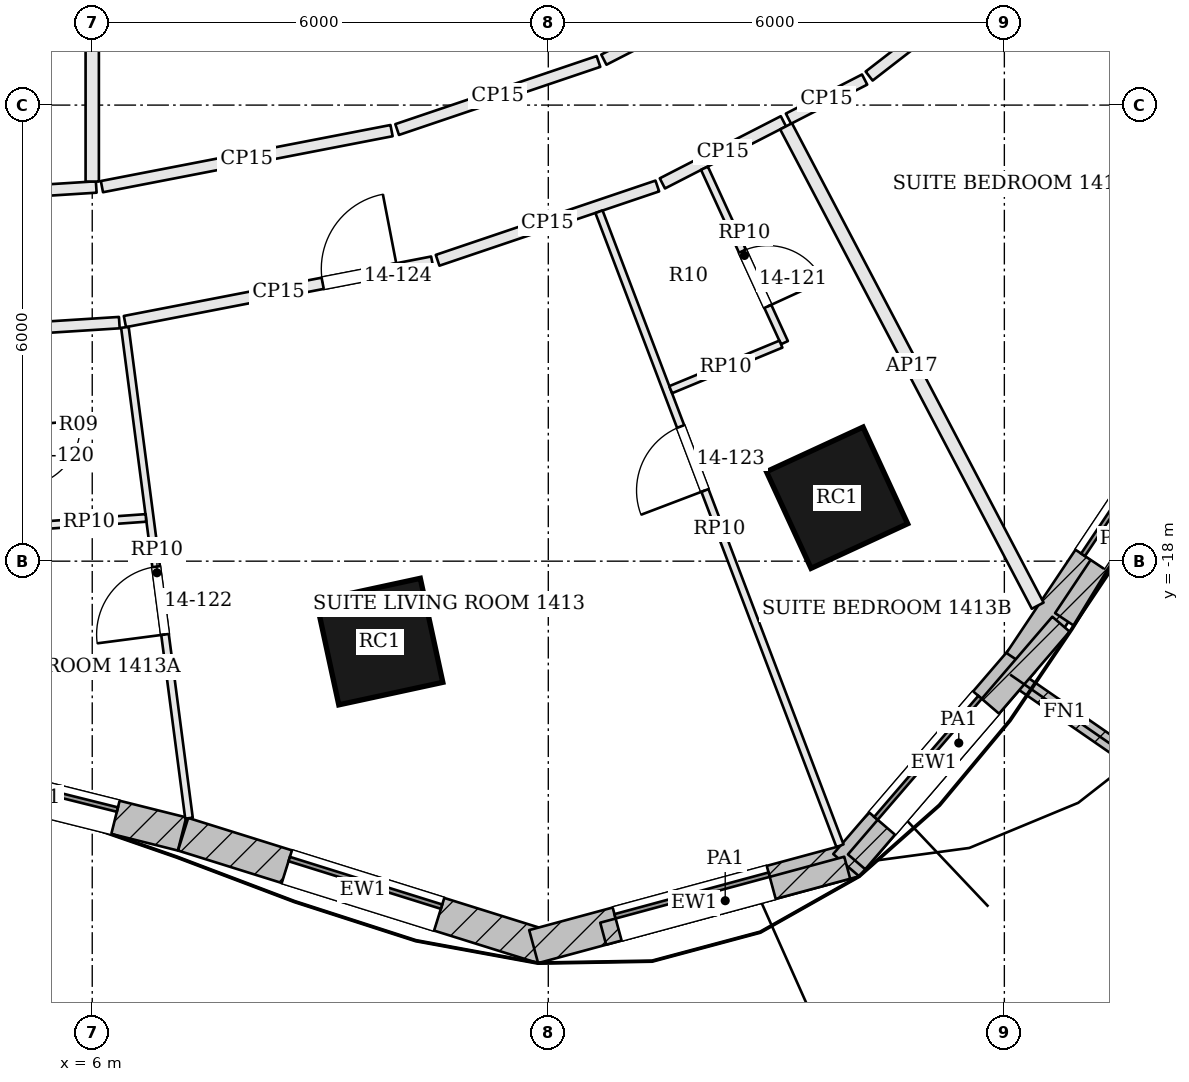
"""IFC4 building model, lengths in metres.
Left out: names, types, materials, properties, quantities, classifications, styles, units other than length and angle.
Written with IfcOpenShell. Run it as: python <this file> out.ifc"""

import sys

from ifc_helpers import new_model, si_unit, direction, frame, frame_2d, origin, origin_2d, place, context, subcontext, project, spatial, rectangle, extrude, element, fill, save


model = new_model("IFC4")
c1 = context("Model", 3, precision=1e-05, world=origin(), true_north=direction((0.0, 1.0)))
c2 = subcontext(c1, "Body", "Model", "MODEL_VIEW")
j1 = project(units=[si_unit("LENGTHUNIT", "METRE"), si_unit("PLANEANGLEUNIT", "RADIAN")], contexts=[c1])
p1 = place(None, origin())
s1 = spatial("IfcSite", under=j1, at=p1, CompositionType="ELEMENT")
p2 = place(p1, origin())
s2 = spatial("IfcBuilding", under=s1, at=p2, CompositionType="ELEMENT")
p3 = place(p2, frame((0.0, 0.0, 66.3)))
s3 = spatial("IfcBuildingStorey", under=s2, at=p3, CompositionType="ELEMENT", Elevation=66.3)
for number, where, z_axis, x_axis in (
    (1, (9.78, -19.058, 0.0), (0.0, 0.0, 1.0), (0.977, 0.211, 0.0)),
    (2, (15.799, -17.165, 0.0), (0.0, 0.0, 1.0), (0.908, 0.419, 0.0)),
):
    element("IfcColumn", number, at=place(p3, frame(where, z_axis=z_axis, x_axis=x_axis)), inside=s3, PredefinedType="COLUMN", context=c2, shape_type="SweptSolid", body=[
        extrude(rectangle(XDim=1.4, YDim=1.4, at=origin_2d()), origin(), (0.0, 0.0, 1.0), 3.6),
    ])
p4 = place(p3, frame((3.392, -20.642, 0.0), z_axis=(0.0, 0.0, 1.0), x_axis=(0.970168229467, -0.242432684539, 0.0)))
e3 = element("IfcWall", 3, at=p4, inside=s3, PredefinedType="SOLIDWALL", context=c2, shape_type="SweptSolid", body=[
    extrude(rectangle(XDim=3.906, YDim=0.45, at=frame_2d((1.953, 0.0))), origin(), (0.0, 0.0, 1.0), 3.4),
])
p5 = place(p4, frame((0.903, 0.0, 0.9)))
e4 = element("IfcOpeningElement", 4, at=p5, cuts=e3, PredefinedType="OPENING", context=c2, shape_type="SweptSolid", body=[
    extrude(rectangle(XDim=2.1, YDim=2.0, at=frame_2d((1.05, 1.0))), frame((0.0, 0.235, 0.0), z_axis=(0.0, -1.0, 0.0), x_axis=(1.0, 0.0, 0.0)), (0.0, 0.0, 1.0), 0.47),
])
p6 = place(p3, frame((7.196, -21.593, 0.0), z_axis=(0.0, 0.0, 1.0), x_axis=(0.954471218741, -0.298303021432, 0.0)))
e5 = element("IfcWall", 5, at=p6, inside=s3, PredefinedType="SOLIDWALL", context=c2, shape_type="SweptSolid", body=[
    extrude(rectangle(XDim=4.96, YDim=0.45, at=frame_2d((2.48, 0.0))), origin(), (0.0, 0.0, 1.0), 3.4),
])
p7 = place(p6, frame((1.43, 0.0, 0.9)))
e6 = element("IfcOpeningElement", 6, at=p7, cuts=e5, PredefinedType="OPENING", context=c2, shape_type="SweptSolid", body=[
    extrude(rectangle(XDim=2.1, YDim=2.0, at=frame_2d((1.05, 1.0))), frame((0.0, 0.235, 0.0), z_axis=(0.0, -1.0, 0.0), x_axis=(1.0, 0.0, 0.0)), (0.0, 0.0, 1.0), 0.47),
])
p8 = place(p3, frame((11.807, -23.071, 0.0), z_axis=(0.0, 0.0, 1.0), x_axis=(0.965334520334, 0.261015830653, 0.0)))
e7 = element("IfcWall", 7, at=p8, inside=s3, PredefinedType="SOLIDWALL", context=c2, shape_type="SweptSolid", body=[
    extrude(rectangle(XDim=4.375, YDim=0.45, at=frame_2d((2.188, 0.0))), origin(), (0.0, 0.0, 1.0), 3.4),
])
p9 = place(p8, frame((1.138, 0.0, 0.9)))
e8 = element("IfcOpeningElement", 8, at=p9, cuts=e7, PredefinedType="OPENING", context=c2, shape_type="SweptSolid", body=[
    extrude(rectangle(XDim=2.1, YDim=2.0, at=frame_2d((1.05, 1.0))), frame((0.0, 0.235, 0.0), z_axis=(0.0, -1.0, 0.0), x_axis=(1.0, 0.0, 0.0)), (0.0, 0.0, 1.0), 0.47),
])
p10 = place(p3, frame((15.919, -21.999, 0.0), z_axis=(0.0, 0.0, 1.0), x_axis=(0.652009971272, 0.758210391225, 0.0)))
e9 = element("IfcWall", 9, at=p10, inside=s3, PredefinedType="SOLIDWALL", context=c2, shape_type="SweptSolid", body=[
    extrude(rectangle(XDim=3.545, YDim=0.45, at=frame_2d((1.772, 0.0))), origin(), (0.0, 0.0, 1.0), 3.4),
])
p11 = place(p10, frame((0.722, 0.0, 0.9)))
e10 = element("IfcOpeningElement", 10, at=p11, cuts=e9, PredefinedType="OPENING", context=c2, shape_type="SweptSolid", body=[
    extrude(rectangle(XDim=2.1, YDim=2.0, at=frame_2d((1.05, 1.0))), frame((0.0, 0.235, 0.0), z_axis=(0.0, -1.0, 0.0), x_axis=(1.0, 0.0, 0.0)), (0.0, 0.0, 1.0), 0.47),
])
p12 = place(p3, frame((18.214, -19.333, 0.0), z_axis=(0.0, 0.0, 1.0), x_axis=(0.555833135316, 0.831293886471, 0.0)))
e11 = element("IfcWall", 11, at=p12, inside=s3, PredefinedType="SOLIDWALL", context=c2, shape_type="SweptSolid", body=[
    extrude(rectangle(XDim=5.368, YDim=0.45, at=frame_2d((2.684, 0.0))), origin(), (0.0, 0.0, 1.0), 3.4),
])
p13 = place(p12, frame((1.634, 0.0, 0.9)))
e12 = element("IfcOpeningElement", 12, at=p13, cuts=e11, PredefinedType="OPENING", context=c2, shape_type="SweptSolid", body=[
    extrude(rectangle(XDim=2.1, YDim=2.0, at=frame_2d((1.05, 1.0))), frame((0.0, 0.235, 0.0), z_axis=(0.0, -1.0, 0.0), x_axis=(1.0, 0.0, 0.0)), (0.0, 0.0, 1.0), 0.47),
])
p14 = place(p3, frame((18.076, -19.492, 0.0), z_axis=(0.0, 0.0, 1.0), x_axis=(0.822618823872, -0.568593238274, 0.0)))
e13 = element("IfcWall", 13, at=p14, inside=s3, PredefinedType="SOLIDWALL", context=c2, shape_type="SweptSolid", body=[
    extrude(rectangle(XDim=1.75, YDim=0.2, at=frame_2d((0.875, 0.0))), origin(), (0.0, 0.0, 1.0), 3.4),
])
p15 = place(p3, frame((12.722, -22.901, 3.6), z_axis=(0.0, 0.0, 1.0), x_axis=(0.96534590031, 0.260973739589, 0.0)))
e14 = element("IfcWall", 14, at=p15, inside=s3, PredefinedType="PARAPET", context=c2, shape_type="SweptSolid", body=[
    extrude(rectangle(XDim=3.326, YDim=0.3, at=frame_2d((1.663, 0.0))), origin(), (0.0, 0.0, 1.0), 1.1),
])
p16 = place(p3, frame((16.056, -21.956, 3.6), z_axis=(0.0, 0.0, 1.0), x_axis=(0.652038588201, 0.75818578165, 0.0)))
e15 = element("IfcWall", 15, at=p16, inside=s3, PredefinedType="PARAPET", context=c2, shape_type="SweptSolid", body=[
    extrude(rectangle(XDim=4.124, YDim=0.3, at=frame_2d((2.062, 0.0))), origin(), (0.0, 0.0, 1.0), 1.1),
])
p17 = place(p3, frame((18.792, -18.767, 3.6), z_axis=(0.0, 0.0, 1.0), x_axis=(0.555843382853, 0.831287034507, 0.0)))
e16 = element("IfcWall", 16, at=p17, inside=s3, PredefinedType="PARAPET", context=c2, shape_type="SweptSolid", body=[
    extrude(rectangle(XDim=2.562, YDim=0.3, at=frame_2d((1.281, 0.0))), origin(), (0.0, 0.0, 1.0), 1.1),
])
p18 = place(p3, frame((3.028, -15.073, 0.0), z_axis=(0.0, 0.0, 1.0), x_axis=(0.997992583289, 0.063330906356, 0.0)))
e17 = element("IfcWall", 17, at=p18, inside=s3, PredefinedType="PARTITIONING", context=c2, shape_type="SweptSolid", body=[
    extrude(rectangle(XDim=3.334, YDim=0.15, at=frame_2d((1.667, 0.0))), origin(), (0.0, 0.0, 1.0), 2.68),
])
p19 = place(p3, frame((6.43, -14.848, 0.0), z_axis=(0.0, 0.0, 1.0), x_axis=(0.981801609996, 0.189909448446, 0.0)))
e18 = element("IfcWall", 18, at=p19, inside=s3, PredefinedType="PARTITIONING", context=c2, shape_type="SweptSolid", body=[
    extrude(rectangle(XDim=4.118, YDim=0.15, at=frame_2d((2.059, 0.0))), origin(), (0.0, 0.0, 1.0), 2.68),
])
p20 = place(p19, frame((2.65, 0.0, 0.0)))
e19 = element("IfcOpeningElement", 19, at=p20, cuts=e18, PredefinedType="OPENING", context=c2, shape_type="SweptSolid", body=[
    extrude(rectangle(XDim=1.0, YDim=2.1, at=frame_2d((0.5, 1.05))), frame((0.0, 0.085, 0.0), z_axis=(0.0, -1.0, 0.0), x_axis=(1.0, 0.0, 0.0)), (0.0, 0.0, 1.0), 0.17),
])
p21 = place(p3, frame((10.544, -14.042, 0.0), z_axis=(0.0, 0.0, 1.0), x_axis=(0.947314242069, 0.320305677085, 0.0)))
e20 = element("IfcWall", 20, at=p21, inside=s3, PredefinedType="PARTITIONING", context=c2, shape_type="SweptSolid", body=[
    extrude(rectangle(XDim=3.051, YDim=0.15, at=frame_2d((1.525, 0.0))), origin(), (0.0, 0.0, 1.0), 2.68),
])
p22 = place(p3, frame((13.501, -13.03, 0.0), z_axis=(0.0, 0.0, 1.0), x_axis=(0.88960147572, 0.456737577168, 0.0)))
e21 = element("IfcWall", 21, at=p22, inside=s3, PredefinedType="PARTITIONING", context=c2, shape_type="SweptSolid", body=[
    extrude(rectangle(XDim=1.79, YDim=0.15, at=frame_2d((0.895, 0.0))), origin(), (0.0, 0.0, 1.0), 2.68),
])
p23 = place(p3, frame((18.439, -18.586, 0.0), z_axis=(0.0, 0.0, 1.0), x_axis=(-0.464812403085, 0.885409187855, 0.0)))
e22 = element("IfcWall", 22, at=p23, inside=s3, PredefinedType="PARTITIONING", context=c2, shape_type="SweptSolid", body=[
    extrude(rectangle(XDim=7.123, YDim=0.175, at=frame_2d((3.562, 0.0))), origin(), (0.0, 0.0, 1.0), 2.68),
])
p24 = place(p3, frame((15.16, -12.178, 0.0), z_axis=(0.0, 0.0, 1.0), x_axis=(0.889562255844, 0.456813958826, 0.0)))
e23 = element("IfcWall", 23, at=p24, inside=s3, PredefinedType="PARTITIONING", context=c2, shape_type="SweptSolid", body=[
    extrude(rectangle(XDim=1.126, YDim=0.15, at=frame_2d((0.563, 0.0))), origin(), (0.0, 0.0, 1.0), 2.68),
])
p25 = place(p3, frame((16.221, -11.618, 0.0), z_axis=(0.0, 0.0, 1.0), x_axis=(0.79075977513, 0.612126602948, 0.0)))
e24 = element("IfcWall", 24, at=p25, inside=s3, PredefinedType="PARTITIONING", context=c2, shape_type="SweptSolid", body=[
    extrude(rectangle(XDim=2.854, YDim=0.15, at=frame_2d((1.427, 0.0))), origin(), (0.0, 0.0, 1.0), 2.68),
])
p26 = place(p3, frame((15.125, -10.173, 0.0), z_axis=(0.0, 0.0, 1.0), x_axis=(-0.889567018144, -0.456804684993, 0.0)))
e25 = element("IfcWall", 25, at=p26, inside=s3, PredefinedType="PARTITIONING", context=c2, shape_type="SweptSolid", body=[
    extrude(rectangle(XDim=2.691, YDim=0.15, at=frame_2d((1.345, 0.0))), origin(), (0.0, 0.0, 1.0), 2.68),
])
p27 = place(p3, frame((12.66, -11.426, 0.0), z_axis=(0.0, 0.0, 1.0), x_axis=(-0.94731220982, -0.320311687465, 0.0)))
e26 = element("IfcWall", 26, at=p27, inside=s3, PredefinedType="PARTITIONING", context=c2, shape_type="SweptSolid", body=[
    extrude(rectangle(XDim=2.796, YDim=0.15, at=frame_2d((1.398, 0.0))), origin(), (0.0, 0.0, 1.0), 2.68),
])
p28 = place(p3, frame((9.938, -12.336, 0.0), z_axis=(0.0, 0.0, 1.0), x_axis=(-0.981799909949, -0.18991823721, 0.0)))
e27 = element("IfcWall", 27, at=p28, inside=s3, PredefinedType="PARTITIONING", context=c2, shape_type="SweptSolid", body=[
    extrude(rectangle(XDim=3.881, YDim=0.15, at=frame_2d((1.94, 0.0))), origin(), (0.0, 0.0, 1.0), 2.68),
])
p29 = place(p3, frame((6.053, -13.077, 0.0), z_axis=(0.0, 0.0, 1.0), x_axis=(-0.997994823425, -0.06329559556, 0.0)))
e28 = element("IfcWall", 28, at=p29, inside=s3, PredefinedType="PARTITIONING", context=c2, shape_type="SweptSolid", body=[
    extrude(rectangle(XDim=4.987, YDim=0.15, at=frame_2d((2.494, 0.0))), origin(), (0.0, 0.0, 1.0), 2.68),
])
p30 = place(p3, frame((7.273, -21.381, 0.0), z_axis=(0.0, 0.0, 1.0), x_axis=(-0.129491443272, 0.991580539401, 0.0)))
e29 = element("IfcWall", 29, at=p30, inside=s3, PredefinedType="PARTITIONING", context=c2, shape_type="SweptSolid", body=[
    extrude(rectangle(XDim=6.512, YDim=0.1, at=frame_2d((3.256, 0.0))), origin(), (0.0, 0.0, 1.0), 2.68),
])
p31 = place(p30, frame((2.437, 0.0, 0.0)))
e30 = element("IfcOpeningElement", 30, at=p31, cuts=e29, PredefinedType="OPENING", context=c2, shape_type="SweptSolid", body=[
    extrude(rectangle(XDim=0.9, YDim=2.4, at=frame_2d((0.45, 1.2))), frame((0.0, 0.06, 0.0), z_axis=(0.0, -1.0, 0.0), x_axis=(1.0, 0.0, 0.0)), (0.0, 0.0, 1.0), 0.12),
])
p32 = place(p3, frame((15.837, -21.743, 0.0), z_axis=(0.0, 0.0, 1.0), x_axis=(-0.355314828952, 0.934746688856, 0.0)))
e31 = element("IfcWall", 31, at=p32, inside=s3, PredefinedType="PARTITIONING", context=c2, shape_type="SweptSolid", body=[
    extrude(rectangle(XDim=8.923, YDim=0.1, at=frame_2d((4.461, 0.0))), origin(), (0.0, 0.0, 1.0), 2.68),
])
p33 = place(p32, frame((5.0, 0.0, 0.0)))
e32 = element("IfcOpeningElement", 32, at=p33, cuts=e31, PredefinedType="OPENING", context=c2, shape_type="SweptSolid", body=[
    extrude(rectangle(XDim=0.9, YDim=2.4, at=frame_2d((0.45, 1.2))), frame((0.0, 0.06, 0.0), z_axis=(0.0, -1.0, 0.0), x_axis=(1.0, 0.0, 0.0)), (0.0, 0.0, 1.0), 0.12),
])
p34 = place(p3, frame((5.213, -17.538, 0.0), z_axis=(0.0, 0.0, 1.0), x_axis=(0.997447931568, 0.071397645698, 0.0)))
e33 = element("IfcWall", 33, at=p34, inside=s3, PredefinedType="PARTITIONING", context=c2, shape_type="SweptSolid", body=[
    extrude(rectangle(XDim=1.498, YDim=0.1, at=frame_2d((0.749, 0.0))), origin(), (0.0, 0.0, 1.0), 2.68),
])
p35 = place(p3, frame((14.054, -12.83, 0.0), z_axis=(0.0, 0.0, 1.0), x_axis=(0.416714635196, -0.909037355015, 0.0)))
e34 = element("IfcWall", 34, at=p35, inside=s3, PredefinedType="PARTITIONING", context=c2, shape_type="SweptSolid", body=[
    extrude(rectangle(XDim=2.525, YDim=0.1, at=frame_2d((1.263, 0.0))), origin(), (0.0, 0.0, 1.0), 2.68),
])
p36 = place(p35, frame((1.2, 0.0, 0.0)))
e35 = element("IfcOpeningElement", 35, at=p36, cuts=e34, PredefinedType="OPENING", context=c2, shape_type="SweptSolid", body=[
    extrude(rectangle(XDim=0.8, YDim=2.1, at=frame_2d((0.4, 1.05))), frame((0.0, 0.06, 0.0), z_axis=(0.0, -1.0, 0.0), x_axis=(1.0, 0.0, 0.0)), (0.0, 0.0, 1.0), 0.12),
])
p37 = place(p3, frame((15.061, -15.145, 0.0), z_axis=(0.0, 0.0, 1.0), x_axis=(-0.924177864306, -0.381962400147, 0.0)))
e36 = element("IfcWall", 36, at=p37, inside=s3, PredefinedType="PARTITIONING", context=c2, shape_type="SweptSolid", body=[
    extrude(rectangle(XDim=1.569, YDim=0.1, at=frame_2d((0.785, 0.0))), origin(), (0.0, 0.0, 1.0), 2.68),
])
p38 = place(p3, frame((18.759, -9.648, 0.0), z_axis=(0.0, 0.0, 1.0), x_axis=(0.731331715945, -0.682021936049, 0.0)))
e37 = element("IfcWall", 37, at=p38, inside=s3, PredefinedType="PARTITIONING", context=c2, shape_type="SweptSolid", body=[
    extrude(rectangle(XDim=2.525, YDim=0.1, at=frame_2d((1.263, 0.0))), origin(), (0.0, 0.0, 1.0), 2.68),
])
p39 = place(p38, frame((1.2, 0.0, 0.0)))
e38 = element("IfcOpeningElement", 38, at=p39, cuts=e37, PredefinedType="OPENING", context=c2, shape_type="SweptSolid", body=[
    extrude(rectangle(XDim=0.8, YDim=2.1, at=frame_2d((0.4, 1.05))), frame((0.0, 0.06, 0.0), z_axis=(0.0, -1.0, 0.0), x_axis=(1.0, 0.0, 0.0)), (0.0, 0.0, 1.0), 0.12),
])
p40 = place(p3, frame((6.0, -13.006, 0.0), z_axis=(0.0, 0.0, 1.0), x_axis=(0.0, 1.0, 0.0)))
e39 = element("IfcWall", 39, at=p40, inside=s3, PredefinedType="PARTITIONING", context=c2, shape_type="SweptSolid", body=[
    extrude(rectangle(XDim=8.131, YDim=0.175, at=frame_2d((4.065, 0.0))), origin(), (0.0, 0.0, 1.0), 2.68),
])
p41 = place(p5, origin())
e40 = element("IfcWindow", 40, at=p41, inside=s3, PartitioningType="SINGLE_PANEL", PredefinedType="WINDOW", context=c2, shape_type="SweptSolid", body=[
    extrude(rectangle(XDim=2.1, YDim=2.0, at=frame_2d((1.05, 1.0))), frame((0.0, 0.135, 0.0), z_axis=(0.0, -1.0, 0.0), x_axis=(1.0, 0.0, 0.0)), (0.0, 0.0, 1.0), 0.06),
])
fill(e4, e40)
p42 = place(p7, origin())
e41 = element("IfcWindow", 41, at=p42, inside=s3, PartitioningType="SINGLE_PANEL", PredefinedType="WINDOW", context=c2, shape_type="SweptSolid", body=[
    extrude(rectangle(XDim=2.1, YDim=2.0, at=frame_2d((1.05, 1.0))), frame((0.0, 0.135, 0.0), z_axis=(0.0, -1.0, 0.0), x_axis=(1.0, 0.0, 0.0)), (0.0, 0.0, 1.0), 0.06),
])
fill(e6, e41)
p43 = place(p9, origin())
e42 = element("IfcWindow", 42, at=p43, inside=s3, PartitioningType="SINGLE_PANEL", PredefinedType="WINDOW", context=c2, shape_type="SweptSolid", body=[
    extrude(rectangle(XDim=2.1, YDim=2.0, at=frame_2d((1.05, 1.0))), frame((0.0, 0.135, 0.0), z_axis=(0.0, -1.0, 0.0), x_axis=(1.0, 0.0, 0.0)), (0.0, 0.0, 1.0), 0.06),
])
fill(e8, e42)
p44 = place(p11, origin())
e43 = element("IfcWindow", 43, at=p44, inside=s3, PartitioningType="SINGLE_PANEL", PredefinedType="WINDOW", context=c2, shape_type="SweptSolid", body=[
    extrude(rectangle(XDim=2.1, YDim=2.0, at=frame_2d((1.05, 1.0))), frame((0.0, 0.135, 0.0), z_axis=(0.0, -1.0, 0.0), x_axis=(1.0, 0.0, 0.0)), (0.0, 0.0, 1.0), 0.06),
])
fill(e10, e43)
p45 = place(p13, origin())
e44 = element("IfcWindow", 44, at=p45, inside=s3, PartitioningType="SINGLE_PANEL", PredefinedType="WINDOW", context=c2, shape_type="SweptSolid", body=[
    extrude(rectangle(XDim=2.1, YDim=2.0, at=frame_2d((1.05, 1.0))), frame((0.0, 0.135, 0.0), z_axis=(0.0, -1.0, 0.0), x_axis=(1.0, 0.0, 0.0)), (0.0, 0.0, 1.0), 0.06),
])
fill(e12, e44)
p46 = place(p36, origin())
e45 = element("IfcDoor", 45, at=p46, inside=s3, OperationType="SINGLE_SWING_RIGHT", PredefinedType="DOOR", context=c2, shape_type="SweptSolid", body=[
    extrude(rectangle(XDim=0.8, YDim=2.1, at=frame_2d((0.4, 1.05))), frame((0.0, 0.025, 0.0), z_axis=(0.0, -1.0, 0.0), x_axis=(1.0, 0.0, 0.0)), (0.0, 0.0, 1.0), 0.05),
])
fill(e35, e45)
p47 = place(p31, origin())
e46 = element("IfcDoor", 46, at=p47, inside=s3, OperationType="SINGLE_SWING_LEFT", PredefinedType="DOOR", context=c2, shape_type="SweptSolid", body=[
    extrude(rectangle(XDim=0.9, YDim=2.4, at=frame_2d((0.45, 1.2))), frame((0.0, 0.025, 0.0), z_axis=(0.0, -1.0, 0.0), x_axis=(1.0, 0.0, 0.0)), (0.0, 0.0, 1.0), 0.05),
])
fill(e30, e46)
p48 = place(p33, origin())
e47 = element("IfcDoor", 47, at=p48, inside=s3, OperationType="SINGLE_SWING_LEFT", PredefinedType="DOOR", context=c2, shape_type="SweptSolid", body=[
    extrude(rectangle(XDim=0.9, YDim=2.4, at=frame_2d((0.45, 1.2))), frame((0.0, 0.025, 0.0), z_axis=(0.0, -1.0, 0.0), x_axis=(1.0, 0.0, 0.0)), (0.0, 0.0, 1.0), 0.05),
])
fill(e32, e47)
p49 = place(p20, origin())
e48 = element("IfcDoor", 48, at=p49, inside=s3, OperationType="SINGLE_SWING_RIGHT", PredefinedType="DOOR", context=c2, shape_type="SweptSolid", body=[
    extrude(rectangle(XDim=1.0, YDim=2.1, at=frame_2d((0.5, 1.05))), frame((0.0, 0.025, 0.0), z_axis=(0.0, -1.0, 0.0), x_axis=(1.0, 0.0, 0.0)), (0.0, 0.0, 1.0), 0.05),
])
fill(e19, e48)
save(model, sys.argv[1])
